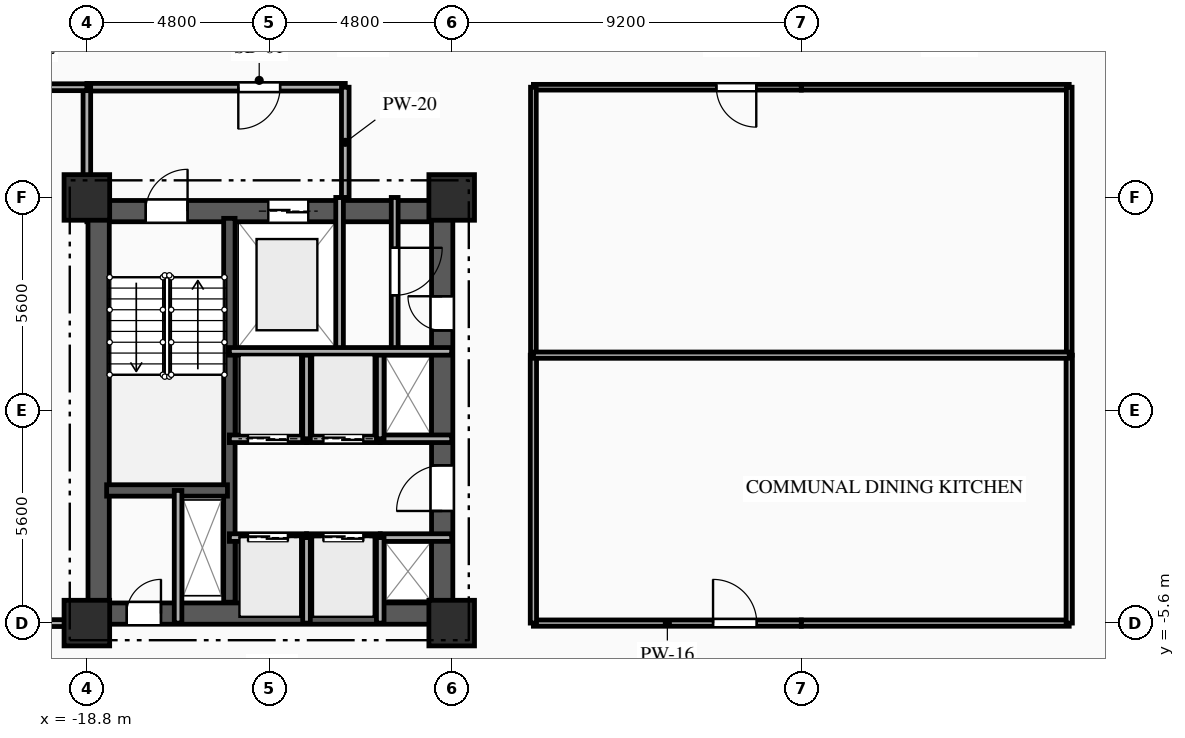
"""IFC4 building model, lengths in metres.
Left out: names, types, materials, properties, quantities, classifications, styles, units other than length and angle.
Written with IfcOpenShell. Run it as: python <this file> out.ifc"""

import sys

from ifc_helpers import new_model, si_unit, direction, frame, frame_2d, origin, origin_2d, place, context, subcontext, project, spatial, rectangle, extrude, element, fill, save


model = new_model("IFC4")
c1 = context("Model", 3, precision=1e-05, world=origin(), true_north=direction((0.0, 1.0)))
c2 = subcontext(c1, "Body", "Model", "MODEL_VIEW")
j1 = project(units=[si_unit("LENGTHUNIT", "METRE"), si_unit("PLANEANGLEUNIT", "RADIAN")], contexts=[c1])
p1 = place(None, origin())
s1 = spatial("IfcSite", under=j1, at=p1, CompositionType="ELEMENT")
p2 = place(p1, origin())
s2 = spatial("IfcBuilding", under=s1, at=p2, CompositionType="ELEMENT")
p3 = place(p2, frame((0.0, 0.0, 50.45)))
s3 = spatial("IfcBuildingStorey", under=s2, at=p3, CompositionType="ELEMENT", Elevation=50.45)
for number, where, z_axis, x_axis in (
    (1, (-18.8, -5.6, 0.0), (0.0, 0.0, 1.0), (1.0, 0.0, 0.0)),
    (2, (-18.8, 5.6, 0.0), (0.0, 0.0, 1.0), (1.0, 0.0, 0.0)),
    (3, (-9.2, -5.6, 0.0), (0.0, 0.0, 1.0), (1.0, 0.0, 0.0)),
    (4, (-9.2, 5.6, 0.0), (0.0, 0.0, 1.0), (1.0, 0.0, 0.0)),
):
    element("IfcColumn", number, at=place(p3, frame(where, z_axis=z_axis, x_axis=x_axis)), inside=s3, PredefinedType="COLUMN", context=c2, shape_type="SweptSolid", body=[
        extrude(rectangle(XDim=1.2, YDim=1.2, at=origin_2d()), origin(), (0.0, 0.0, 1.0), 3.35),
    ])
p4 = place(p3, frame((-18.8, 5.24, 0.0), z_axis=(0.0, 0.0, 1.0), x_axis=(1.0, 0.0, 0.0)))
e5 = element("IfcWall", 5, at=p4, inside=s3, PredefinedType="SHEAR", context=c2, shape_type="SweptSolid", body=[
    extrude(rectangle(XDim=9.6, YDim=0.56, at=frame_2d((4.8, 0.0))), origin(), (0.0, 0.0, 1.0), 3.035),
])
p5 = place(p4, frame((1.55, 0.0, 0.0)))
e6 = element("IfcOpeningElement", 6, at=p5, cuts=e5, PredefinedType="OPENING", context=c2, shape_type="SweptSolid", body=[
    extrude(rectangle(XDim=1.1, YDim=2.15, at=frame_2d((0.55, 1.075))), frame((0.0, 0.29, 0.0), z_axis=(0.0, -1.0, 0.0), x_axis=(1.0, 0.0, 0.0)), (0.0, 0.0, 1.0), 0.58),
])
p6 = place(p4, frame((4.775, 0.0, 0.0)))
e7 = element("IfcOpeningElement", 7, at=p6, cuts=e5, PredefinedType="OPENING", context=c2, shape_type="SweptSolid", body=[
    extrude(rectangle(XDim=1.05, YDim=2.1, at=frame_2d((0.525, 1.05))), frame((0.0, 0.29, 0.0), z_axis=(0.0, -1.0, 0.0), x_axis=(1.0, 0.0, 0.0)), (0.0, 0.0, 1.0), 0.58),
])
p7 = place(p3, frame((-18.8, -5.35, 0.0), z_axis=(0.0, 0.0, 1.0), x_axis=(1.0, 0.0, 0.0)))
e8 = element("IfcWall", 8, at=p7, inside=s3, PredefinedType="SHEAR", context=c2, shape_type="SweptSolid", body=[
    extrude(rectangle(XDim=9.6, YDim=0.56, at=frame_2d((4.8, 0.0))), origin(), (0.0, 0.0, 1.0), 3.035),
])
p8 = place(p7, frame((1.05, 0.0, 0.0)))
e9 = element("IfcOpeningElement", 9, at=p8, cuts=e8, PredefinedType="OPENING", context=c2, shape_type="SweptSolid", body=[
    extrude(rectangle(XDim=0.9, YDim=2.1, at=frame_2d((0.45, 1.05))), frame((0.0, 0.29, 0.0), z_axis=(0.0, -1.0, 0.0), x_axis=(1.0, 0.0, 0.0)), (0.0, 0.0, 1.0), 0.58),
])
p9 = place(p3, frame((-18.49, -5.05, 0.0), z_axis=(0.0, 0.0, 1.0), x_axis=(0.0, 1.0, 0.0)))
e10 = element("IfcWall", 10, at=p9, inside=s3, PredefinedType="SHEAR", context=c2, shape_type="SweptSolid", body=[
    extrude(rectangle(XDim=10.1, YDim=0.56, at=frame_2d((5.05, 0.0))), origin(), (0.0, 0.0, 1.0), 3.035),
])
p10 = place(p3, frame((-9.45, -5.05, 0.0), z_axis=(0.0, 0.0, 1.0), x_axis=(0.0, 1.0, 0.0)))
e11 = element("IfcWall", 11, at=p10, inside=s3, PredefinedType="SHEAR", context=c2, shape_type="SweptSolid", body=[
    extrude(rectangle(XDim=10.1, YDim=0.56, at=frame_2d((5.05, 0.0))), origin(), (0.0, 0.0, 1.0), 3.035),
])
p11 = place(p10, frame((7.15, 0.0, 0.0)))
e12 = element("IfcOpeningElement", 12, at=p11, cuts=e11, PredefinedType="OPENING", context=c2, shape_type="SweptSolid", body=[
    extrude(rectangle(XDim=0.9, YDim=2.1, at=frame_2d((0.45, 1.05))), frame((0.0, 0.29, 0.0), z_axis=(0.0, -1.0, 0.0), x_axis=(1.0, 0.0, 0.0)), (0.0, 0.0, 1.0), 0.58),
])
p12 = place(p10, frame((2.4, 0.0, 0.0)))
e13 = element("IfcOpeningElement", 13, at=p12, cuts=e11, PredefinedType="OPENING", context=c2, shape_type="SweptSolid", body=[
    extrude(rectangle(XDim=1.2, YDim=2.15, at=frame_2d((0.6, 1.075))), frame((0.0, 0.29, 0.0), z_axis=(0.0, -1.0, 0.0), x_axis=(1.0, 0.0, 0.0)), (0.0, 0.0, 1.0), 0.58),
])
p13 = place(p3, frame((-15.05, -5.05, 0.0), z_axis=(0.0, 0.0, 1.0), x_axis=(0.0, 1.0, 0.0)))
e14 = element("IfcWall", 14, at=p13, inside=s3, PredefinedType="SHEAR", context=c2, shape_type="SweptSolid", body=[
    extrude(rectangle(XDim=10.1, YDim=0.3, at=frame_2d((5.05, 0.0))), origin(), (0.0, 0.0, 1.0), 3.035),
])
p14 = place(p3, frame((-18.28, -2.11, 0.0), z_axis=(0.0, 0.0, 1.0), x_axis=(1.0, 0.0, 0.0)))
e15 = element("IfcWall", 15, at=p14, inside=s3, PredefinedType="SHEAR", context=c2, shape_type="SweptSolid", body=[
    extrude(rectangle(XDim=3.18, YDim=0.3, at=frame_2d((1.59, 0.0))), origin(), (0.0, 0.0, 1.0), 3.035),
])
p15 = place(p3, frame((-16.4, -5.6, 0.0), z_axis=(0.0, 0.0, 1.0), x_axis=(0.0, 1.0, 0.0)))
e16 = element("IfcWall", 16, at=p15, inside=s3, PredefinedType="PARTITIONING", context=c2, shape_type="SweptSolid", body=[
    extrude(rectangle(XDim=3.49, YDim=0.2, at=frame_2d((1.745, 0.0))), origin(), (0.0, 0.0, 1.0), 3.035),
])
p16 = place(p3, frame((-12.15, 1.55, 0.0), z_axis=(0.0, 0.0, 1.0), x_axis=(0.0, 1.0, 0.0)))
e17 = element("IfcWall", 17, at=p16, inside=s3, PredefinedType="PARTITIONING", context=c2, shape_type="SweptSolid", body=[
    extrude(rectangle(XDim=4.05, YDim=0.2, at=frame_2d((2.025, 0.0))), origin(), (0.0, 0.0, 1.0), 3.035),
])
p17 = place(p3, frame((-12.0, 8.5, 0.0), z_axis=(0.0, 0.0, 1.0), x_axis=(-1.0, 0.0, 0.0)))
e18 = element("IfcWall", 18, at=p17, inside=s3, PredefinedType="PARTITIONING", context=c2, shape_type="SweptSolid", body=[
    extrude(rectangle(XDim=6.8, YDim=0.2, at=frame_2d((3.4, 0.0))), origin(), (0.0, 0.0, 1.0), 3.035),
])
p18 = place(p17, frame((1.715, 0.0, 0.0)))
e19 = element("IfcOpeningElement", 19, at=p18, cuts=e18, PredefinedType="OPENING", context=c2, shape_type="SweptSolid", body=[
    extrude(rectangle(XDim=1.1, YDim=2.15, at=frame_2d((0.55, 1.075))), frame((0.0, 0.11, 0.0), z_axis=(0.0, -1.0, 0.0), x_axis=(1.0, 0.0, 0.0)), (0.0, 0.0, 1.0), 0.22),
])
p19 = place(p3, frame((-12.0, 5.6, 0.0), z_axis=(0.0, 0.0, 1.0), x_axis=(0.0, 1.0, 0.0)))
e20 = element("IfcWall", 20, at=p19, inside=s3, PredefinedType="PARTITIONING", context=c2, shape_type="SweptSolid", body=[
    extrude(rectangle(XDim=2.9, YDim=0.2, at=frame_2d((1.45, 0.0))), origin(), (0.0, 0.0, 1.0), 3.035),
])
p20 = place(p3, frame((-18.8, 8.5, 0.0), z_axis=(0.0, 0.0, 1.0), x_axis=(0.0, -1.0, 0.0)))
e21 = element("IfcWall", 21, at=p20, inside=s3, PredefinedType="PARTITIONING", context=c2, shape_type="SweptSolid", body=[
    extrude(rectangle(XDim=2.9, YDim=0.2, at=frame_2d((1.45, 0.0))), origin(), (0.0, 0.0, 1.0), 2.52),
])
p21 = place(p3, frame((-10.7, 5.6, 0.0), z_axis=(0.0, 0.0, 1.0), x_axis=(0.0, -1.0, 0.0)))
e22 = element("IfcWall", 22, at=p21, inside=s3, PredefinedType="PARTITIONING", context=c2, shape_type="SweptSolid", body=[
    extrude(rectangle(XDim=4.05, YDim=0.18, at=frame_2d((2.025, 0.0))), origin(), (0.0, 0.0, 1.0), 3.035),
])
p22 = place(p21, frame((1.325, 0.0, 0.0)))
e23 = element("IfcOpeningElement", 23, at=p22, cuts=e22, PredefinedType="OPENING", context=c2, shape_type="SweptSolid", body=[
    extrude(rectangle(XDim=1.25, YDim=2.2, at=frame_2d((0.625, 1.1))), frame((0.0, 0.1, 0.0), z_axis=(0.0, -1.0, 0.0), x_axis=(1.0, 0.0, 0.0)), (0.0, 0.0, 1.0), 0.2),
])
p23 = place(p3, frame((-15.05, -3.35, 0.0), z_axis=(0.0, 0.0, 1.0), x_axis=(1.0, 0.0, 0.0)))
e24 = element("IfcWall", 24, at=p23, inside=s3, PredefinedType="PARTITIONING", context=c2, shape_type="SweptSolid", body=[
    extrude(rectangle(XDim=2.03, YDim=0.2, at=frame_2d((1.015, 0.0))), origin(), (0.0, 0.0, 1.0), 3.035),
])
p24 = place(p23, frame((0.49, 0.0, 0.0)))
e25 = element("IfcOpeningElement", 25, at=p24, cuts=e24, PredefinedType="OPENING", context=c2, shape_type="SweptSolid", body=[
    extrude(rectangle(XDim=1.05, YDim=2.1, at=frame_2d((0.525, 1.05))), frame((0.0, 0.11, 0.0), z_axis=(0.0, -1.0, 0.0), x_axis=(1.0, 0.0, 0.0)), (0.0, 0.0, 1.0), 0.22),
])
p25 = place(p3, frame((-13.02, -3.35, 0.0), z_axis=(0.0, 0.0, 1.0), x_axis=(1.0, 0.0, 0.0)))
e26 = element("IfcWall", 26, at=p25, inside=s3, PredefinedType="PARTITIONING", context=c2, shape_type="SweptSolid", body=[
    extrude(rectangle(XDim=1.94, YDim=0.2, at=frame_2d((0.97, 0.0))), origin(), (0.0, 0.0, 1.0), 3.035),
])
p26 = place(p25, frame((0.445, 0.0, 0.0)))
e27 = element("IfcOpeningElement", 27, at=p26, cuts=e26, PredefinedType="OPENING", context=c2, shape_type="SweptSolid", body=[
    extrude(rectangle(XDim=1.05, YDim=2.1, at=frame_2d((0.525, 1.05))), frame((0.0, 0.11, 0.0), z_axis=(0.0, -1.0, 0.0), x_axis=(1.0, 0.0, 0.0)), (0.0, 0.0, 1.0), 0.22),
])
p27 = place(p3, frame((-11.08, -3.35, 0.0), z_axis=(0.0, 0.0, 1.0), x_axis=(1.0, 0.0, 0.0)))
e28 = element("IfcWall", 28, at=p27, inside=s3, PredefinedType="PARTITIONING", context=c2, shape_type="SweptSolid", body=[
    extrude(rectangle(XDim=1.88, YDim=0.2, at=frame_2d((0.94, 0.0))), origin(), (0.0, 0.0, 1.0), 2.75),
])
p28 = place(p3, frame((-13.02, -0.75, 0.0), z_axis=(0.0, 0.0, 1.0), x_axis=(-1.0, 0.0, 0.0)))
e29 = element("IfcWall", 29, at=p28, inside=s3, PredefinedType="PARTITIONING", context=c2, shape_type="SweptSolid", body=[
    extrude(rectangle(XDim=2.03, YDim=0.2, at=frame_2d((1.015, 0.0))), origin(), (0.0, 0.0, 1.0), 3.035),
])
p29 = place(p28, frame((0.49, 0.0, 0.0)))
e30 = element("IfcOpeningElement", 30, at=p29, cuts=e29, PredefinedType="OPENING", context=c2, shape_type="SweptSolid", body=[
    extrude(rectangle(XDim=1.05, YDim=2.1, at=frame_2d((0.525, 1.05))), frame((0.0, 0.11, 0.0), z_axis=(0.0, -1.0, 0.0), x_axis=(1.0, 0.0, 0.0)), (0.0, 0.0, 1.0), 0.22),
])
p30 = place(p3, frame((-11.08, -0.75, 0.0), z_axis=(0.0, 0.0, 1.0), x_axis=(-1.0, 0.0, 0.0)))
e31 = element("IfcWall", 31, at=p30, inside=s3, PredefinedType="PARTITIONING", context=c2, shape_type="SweptSolid", body=[
    extrude(rectangle(XDim=1.94, YDim=0.2, at=frame_2d((0.97, 0.0))), origin(), (0.0, 0.0, 1.0), 3.035),
])
p31 = place(p30, frame((0.445, 0.0, 0.0)))
e32 = element("IfcOpeningElement", 32, at=p31, cuts=e31, PredefinedType="OPENING", context=c2, shape_type="SweptSolid", body=[
    extrude(rectangle(XDim=1.05, YDim=2.1, at=frame_2d((0.525, 1.05))), frame((0.0, 0.11, 0.0), z_axis=(0.0, -1.0, 0.0), x_axis=(1.0, 0.0, 0.0)), (0.0, 0.0, 1.0), 0.22),
])
p32 = place(p3, frame((-9.2, -0.75, 0.0), z_axis=(0.0, 0.0, 1.0), x_axis=(-1.0, 0.0, 0.0)))
e33 = element("IfcWall", 33, at=p32, inside=s3, PredefinedType="PARTITIONING", context=c2, shape_type="SweptSolid", body=[
    extrude(rectangle(XDim=1.88, YDim=0.2, at=frame_2d((0.94, 0.0))), origin(), (0.0, 0.0, 1.0), 3.035),
])
for number, where, z_axis, x_axis in (
    (34, (-13.02, -5.6, 0.0), (0.0, 0.0, 1.0), (0.0, 1.0, 0.0)),
    (35, (-11.08, -5.6, 0.0), (0.0, 0.0, 1.0), (0.0, 1.0, 0.0)),
):
    element("IfcWall", number, at=place(p3, frame(where, z_axis=z_axis, x_axis=x_axis)), inside=s3, PredefinedType="PARTITIONING", context=c2, shape_type="SweptSolid", body=[
        extrude(rectangle(XDim=2.25, YDim=0.2, at=frame_2d((1.125, 0.0))), origin(), (0.0, 0.0, 1.0), 3.035),
    ])
for number, where, z_axis, x_axis in (
    (36, (-13.02, -0.75, 0.0), (0.0, 0.0, 1.0), (0.0, 1.0, 0.0)),
    (37, (-11.08, -0.75, 0.0), (0.0, 0.0, 1.0), (0.0, 1.0, 0.0)),
):
    element("IfcWall", number, at=place(p3, frame(where, z_axis=z_axis, x_axis=x_axis)), inside=s3, PredefinedType="PARTITIONING", context=c2, shape_type="SweptSolid", body=[
        extrude(rectangle(XDim=2.3, YDim=0.2, at=frame_2d((1.15, 0.0))), origin(), (0.0, 0.0, 1.0), 3.035),
    ])
p33 = place(p3, frame((-18.8, 8.5, 0.0), z_axis=(0.0, 0.0, 1.0), x_axis=(-1.0, 0.0, 0.0)))
e38 = element("IfcWall", 38, at=p33, inside=s3, PredefinedType="PARTITIONING", context=c2, shape_type="SweptSolid", body=[
    extrude(rectangle(XDim=2.65, YDim=0.18, at=frame_2d((1.325, 0.0))), origin(), (0.0, 0.0, 1.0), 3.035),
])
p34 = place(p33, frame((1.009, 0.0, 0.0)))
e39 = element("IfcOpeningElement", 39, at=p34, cuts=e38, PredefinedType="OPENING", context=c2, shape_type="SweptSolid", body=[
    extrude(rectangle(XDim=1.0, YDim=2.15, at=frame_2d((0.5, 1.075))), frame((0.0, 0.1, 0.0), z_axis=(0.0, -1.0, 0.0), x_axis=(1.0, 0.0, 0.0)), (0.0, 0.0, 1.0), 0.2),
])
p35 = place(p3, frame((0.0, 8.5, 0.0), z_axis=(0.0, 0.0, 1.0), x_axis=(-1.0, 0.0, 0.0)))
e40 = element("IfcWall", 40, at=p35, inside=s3, PredefinedType="PARTITIONING", context=c2, shape_type="SweptSolid", body=[
    extrude(rectangle(XDim=7.05, YDim=0.15, at=frame_2d((3.525, 0.0))), origin(), (0.0, 0.0, 1.0), 3.035),
])
p36 = place(p35, frame((1.185, 0.0, 0.0)))
e41 = element("IfcOpeningElement", 41, at=p36, cuts=e40, PredefinedType="OPENING", context=c2, shape_type="SweptSolid", body=[
    extrude(rectangle(XDim=1.05, YDim=2.15, at=frame_2d((0.525, 1.075))), frame((0.0, 0.085, 0.0), z_axis=(0.0, -1.0, 0.0), x_axis=(1.0, 0.0, 0.0)), (0.0, 0.0, 1.0), 0.17),
])
p37 = place(p3, frame((7.05, 8.5, 0.0), z_axis=(0.0, 0.0, 1.0), x_axis=(-1.0, 0.0, 0.0)))
e42 = element("IfcWall", 42, at=p37, inside=s3, PredefinedType="PARTITIONING", context=c2, shape_type="SweptSolid", body=[
    extrude(rectangle(XDim=7.05, YDim=0.15, at=frame_2d((3.525, 0.0))), origin(), (0.0, 0.0, 1.0), 3.035),
])
p38 = place(p3, frame((-21.45, -5.6, 0.0), z_axis=(0.0, 0.0, 1.0), x_axis=(1.0, 0.0, 0.0)))
e43 = element("IfcWall", 43, at=p38, inside=s3, PredefinedType="PARTITIONING", context=c2, shape_type="SweptSolid", body=[
    extrude(rectangle(XDim=2.65, YDim=0.18, at=frame_2d((1.325, 0.0))), origin(), (0.0, 0.0, 1.0), 3.035),
])
p39 = place(p3, frame((-7.05, -5.6, 0.0), z_axis=(0.0, 0.0, 1.0), x_axis=(1.0, 0.0, 0.0)))
e44 = element("IfcWall", 44, at=p39, inside=s3, PredefinedType="PARTITIONING", context=c2, shape_type="SweptSolid", body=[
    extrude(rectangle(XDim=7.05, YDim=0.165, at=frame_2d((3.525, 0.0))), origin(), (0.0, 0.0, 1.0), 2.52),
])
p40 = place(p39, frame((4.728, 0.0, 0.0)))
e45 = element("IfcOpeningElement", 45, at=p40, cuts=e44, PredefinedType="OPENING", context=c2, shape_type="SweptSolid", body=[
    extrude(rectangle(XDim=1.15, YDim=2.15, at=frame_2d((0.575, 1.075))), frame((0.0, 0.093, 0.0), z_axis=(0.0, -1.0, 0.0), x_axis=(1.0, 0.0, 0.0)), (0.0, 0.0, 1.0), 0.185),
])
p41 = place(p3, frame((0.0, -5.6, 0.0), z_axis=(0.0, 0.0, 1.0), x_axis=(1.0, 0.0, 0.0)))
e46 = element("IfcWall", 46, at=p41, inside=s3, PredefinedType="PARTITIONING", context=c2, shape_type="SweptSolid", body=[
    extrude(rectangle(XDim=7.05, YDim=0.165, at=frame_2d((3.525, 0.0))), origin(), (0.0, 0.0, 1.0), 2.52),
])
p42 = place(p3, frame((-7.05, 1.45, 0.0), z_axis=(0.0, 0.0, 1.0), x_axis=(0.0, -1.0, 0.0)))
e47 = element("IfcWall", 47, at=p42, inside=s3, PredefinedType="PARTITIONING", context=c2, shape_type="SweptSolid", body=[
    extrude(rectangle(XDim=7.05, YDim=0.165, at=frame_2d((3.525, 0.0))), origin(), (0.0, 0.0, 1.0), 3.035),
])
p43 = place(p3, frame((-7.05, 8.5, 0.0), z_axis=(0.0, 0.0, 1.0), x_axis=(0.0, -1.0, 0.0)))
e48 = element("IfcWall", 48, at=p43, inside=s3, PredefinedType="PARTITIONING", context=c2, shape_type="SweptSolid", body=[
    extrude(rectangle(XDim=7.05, YDim=0.15, at=frame_2d((3.525, 0.0))), origin(), (0.0, 0.0, 1.0), 3.035),
])
p44 = place(p3, frame((7.05, -5.6, 0.0), z_axis=(0.0, 0.0, 1.0), x_axis=(0.0, 1.0, 0.0)))
e49 = element("IfcWall", 49, at=p44, inside=s3, PredefinedType="PARTITIONING", context=c2, shape_type="SweptSolid", body=[
    extrude(rectangle(XDim=7.05, YDim=0.165, at=frame_2d((3.525, 0.0))), origin(), (0.0, 0.0, 1.0), 3.035),
])
p45 = place(p3, frame((7.05, 1.45, 0.0), z_axis=(0.0, 0.0, 1.0), x_axis=(0.0, 1.0, 0.0)))
e50 = element("IfcWall", 50, at=p45, inside=s3, PredefinedType="PARTITIONING", context=c2, shape_type="SweptSolid", body=[
    extrude(rectangle(XDim=7.05, YDim=0.15, at=frame_2d((3.525, 0.0))), origin(), (0.0, 0.0, 1.0), 3.035),
])
p46 = place(p3, frame((-7.05, 1.45, 0.0), z_axis=(0.0, 0.0, 1.0), x_axis=(1.0, 0.0, 0.0)))
e51 = element("IfcWall", 51, at=p46, inside=s3, PredefinedType="PARTITIONING", context=c2, shape_type="SweptSolid", body=[
    extrude(rectangle(XDim=14.1, YDim=0.165, at=frame_2d((7.05, 0.0))), origin(), (0.0, 0.0, 1.0), 3.035),
])
p47 = place(p3, frame((-15.05, 1.55, 0.0), z_axis=(0.0, 0.0, 1.0), x_axis=(1.0, 0.0, 0.0)))
e52 = element("IfcWall", 52, at=p47, inside=s3, PredefinedType="PARTITIONING", context=c2, shape_type="SweptSolid", body=[
    extrude(rectangle(XDim=5.85, YDim=0.2, at=frame_2d((2.925, 0.0))), origin(), (0.0, 0.0, 1.0), 3.035),
])
p48 = place(p5, origin())
e53 = element("IfcDoor", 53, at=p48, inside=s3, OperationType="SINGLE_SWING_RIGHT", PredefinedType="DOOR", context=c2, shape_type="SweptSolid", body=[
    extrude(rectangle(XDim=1.1, YDim=2.15, at=frame_2d((0.55, 1.075))), frame((0.0, 0.025, 0.0), z_axis=(0.0, -1.0, 0.0), x_axis=(1.0, 0.0, 0.0)), (0.0, 0.0, 1.0), 0.05),
])
fill(e6, e53)
p49 = place(p6, origin())
e54 = element("IfcDoor", 54, at=p49, inside=s3, OperationType="DOUBLE_DOOR_SLIDING", PredefinedType="DOOR", context=c2, shape_type="SweptSolid", body=[
    extrude(rectangle(XDim=1.05, YDim=2.1, at=frame_2d((0.525, 1.05))), frame((0.0, 0.025, 0.0), z_axis=(0.0, -1.0, 0.0), x_axis=(1.0, 0.0, 0.0)), (0.0, 0.0, 1.0), 0.05),
])
fill(e7, e54)
p50 = place(p8, origin())
e55 = element("IfcDoor", 55, at=p50, inside=s3, OperationType="SINGLE_SWING_RIGHT", PredefinedType="DOOR", context=c2, shape_type="SweptSolid", body=[
    extrude(rectangle(XDim=0.9, YDim=2.1, at=frame_2d((0.45, 1.05))), frame((0.0, 0.025, 0.0), z_axis=(0.0, -1.0, 0.0), x_axis=(1.0, 0.0, 0.0)), (0.0, 0.0, 1.0), 0.05),
])
fill(e9, e55)
p51 = place(p18, origin())
e56 = element("IfcDoor", 56, at=p51, inside=s3, OperationType="SINGLE_SWING_RIGHT", PredefinedType="DOOR", context=c2, shape_type="SweptSolid", body=[
    extrude(rectangle(XDim=1.1, YDim=2.15, at=frame_2d((0.55, 1.075))), frame((0.0, 0.025, 0.0), z_axis=(0.0, -1.0, 0.0), x_axis=(1.0, 0.0, 0.0)), (0.0, 0.0, 1.0), 0.05),
])
fill(e19, e56)
p52 = place(p22, origin())
e57 = element("IfcDoor", 57, at=p52, inside=s3, OperationType="SINGLE_SWING_LEFT", PredefinedType="DOOR", context=c2, shape_type="SweptSolid", body=[
    extrude(rectangle(XDim=1.25, YDim=2.2, at=frame_2d((0.625, 1.1))), frame((0.0, 0.025, 0.0), z_axis=(0.0, -1.0, 0.0), x_axis=(1.0, 0.0, 0.0)), (0.0, 0.0, 1.0), 0.05),
])
fill(e23, e57)
p53 = place(p11, origin())
e58 = element("IfcDoor", 58, at=p53, inside=s3, OperationType="SINGLE_SWING_RIGHT", PredefinedType="DOOR", context=c2, shape_type="SweptSolid", body=[
    extrude(rectangle(XDim=0.9, YDim=2.1, at=frame_2d((0.45, 1.05))), frame((0.0, 0.025, 0.0), z_axis=(0.0, -1.0, 0.0), x_axis=(1.0, 0.0, 0.0)), (0.0, 0.0, 1.0), 0.05),
])
fill(e12, e58)
p54 = place(p24, origin())
e59 = element("IfcDoor", 59, at=p54, inside=s3, OperationType="DOUBLE_DOOR_SLIDING", PredefinedType="DOOR", context=c2, shape_type="SweptSolid", body=[
    extrude(rectangle(XDim=1.05, YDim=2.1, at=frame_2d((0.525, 1.05))), frame((0.0, 0.025, 0.0), z_axis=(0.0, -1.0, 0.0), x_axis=(1.0, 0.0, 0.0)), (0.0, 0.0, 1.0), 0.05),
])
fill(e25, e59)
p55 = place(p26, origin())
e60 = element("IfcDoor", 60, at=p55, inside=s3, OperationType="DOUBLE_DOOR_SLIDING", PredefinedType="DOOR", context=c2, shape_type="SweptSolid", body=[
    extrude(rectangle(XDim=1.05, YDim=2.1, at=frame_2d((0.525, 1.05))), frame((0.0, 0.025, 0.0), z_axis=(0.0, -1.0, 0.0), x_axis=(1.0, 0.0, 0.0)), (0.0, 0.0, 1.0), 0.05),
])
fill(e27, e60)
p56 = place(p29, origin())
e61 = element("IfcDoor", 61, at=p56, inside=s3, OperationType="DOUBLE_DOOR_SLIDING", PredefinedType="DOOR", context=c2, shape_type="SweptSolid", body=[
    extrude(rectangle(XDim=1.05, YDim=2.1, at=frame_2d((0.525, 1.05))), frame((0.0, 0.025, 0.0), z_axis=(0.0, -1.0, 0.0), x_axis=(1.0, 0.0, 0.0)), (0.0, 0.0, 1.0), 0.05),
])
fill(e30, e61)
p57 = place(p31, origin())
e62 = element("IfcDoor", 62, at=p57, inside=s3, OperationType="DOUBLE_DOOR_SLIDING", PredefinedType="DOOR", context=c2, shape_type="SweptSolid", body=[
    extrude(rectangle(XDim=1.05, YDim=2.1, at=frame_2d((0.525, 1.05))), frame((0.0, 0.025, 0.0), z_axis=(0.0, -1.0, 0.0), x_axis=(1.0, 0.0, 0.0)), (0.0, 0.0, 1.0), 0.05),
])
fill(e32, e62)
p58 = place(p12, origin())
e63 = element("IfcDoor", 63, at=p58, inside=s3, OperationType="SINGLE_SWING_LEFT", PredefinedType="DOOR", context=c2, shape_type="SweptSolid", body=[
    extrude(rectangle(XDim=1.2, YDim=2.15, at=frame_2d((0.6, 1.075))), frame((0.0, 0.025, 0.0), z_axis=(0.0, -1.0, 0.0), x_axis=(1.0, 0.0, 0.0)), (0.0, 0.0, 1.0), 0.05),
])
fill(e13, e63)
p59 = place(p36, origin())
e64 = element("IfcDoor", 64, at=p59, inside=s3, OperationType="SINGLE_SWING_LEFT", PredefinedType="DOOR", context=c2, shape_type="SweptSolid", body=[
    extrude(rectangle(XDim=1.05, YDim=2.15, at=frame_2d((0.525, 1.075))), frame((0.0, 0.025, 0.0), z_axis=(0.0, -1.0, 0.0), x_axis=(1.0, 0.0, 0.0)), (0.0, 0.0, 1.0), 0.05),
])
fill(e41, e64)
p60 = place(p40, origin())
e65 = element("IfcDoor", 65, at=p60, inside=s3, OperationType="SINGLE_SWING_LEFT", PredefinedType="DOOR", context=c2, shape_type="SweptSolid", body=[
    extrude(rectangle(XDim=1.15, YDim=2.15, at=frame_2d((0.575, 1.075))), frame((0.0, 0.025, 0.0), z_axis=(0.0, -1.0, 0.0), x_axis=(1.0, 0.0, 0.0)), (0.0, 0.0, 1.0), 0.05),
])
fill(e45, e65)
save(model, sys.argv[1])
